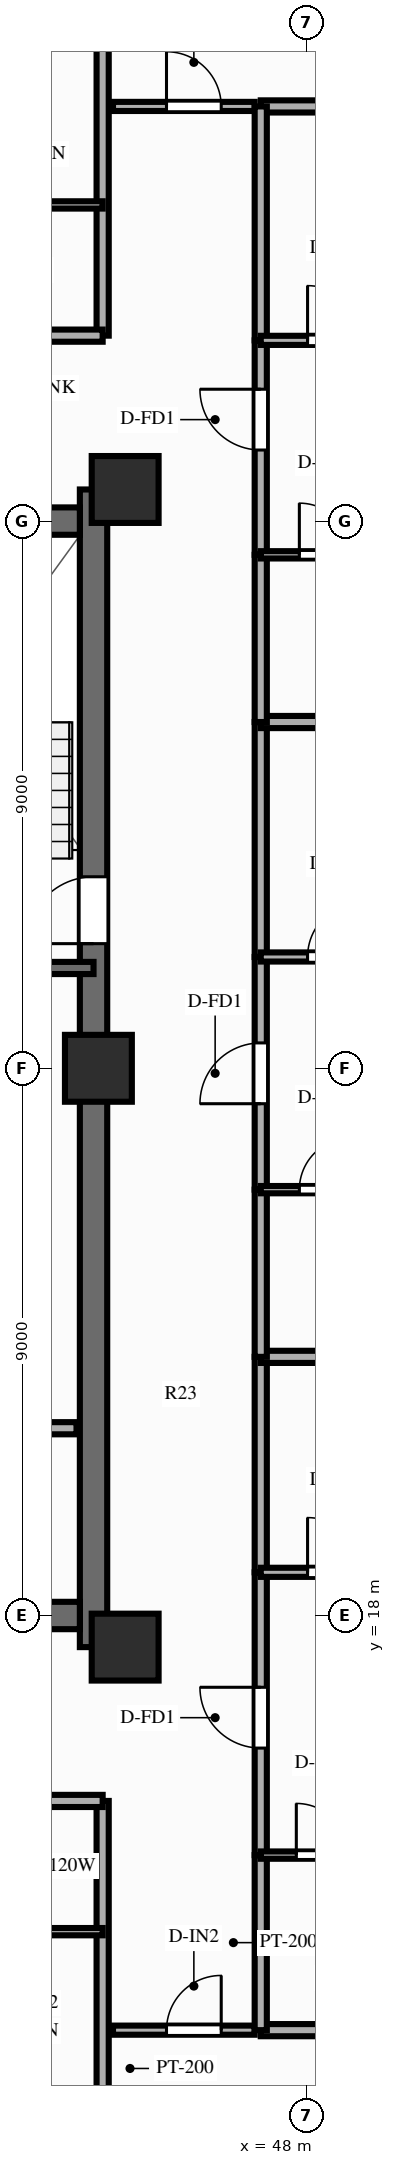
"""IFC4 building model, lengths in metres.
Left out: names, types, materials, properties, quantities, classifications, styles, units other than length and angle.
Written with IfcOpenShell. Run it as: python <this file> out.ifc"""

import sys

from ifc_helpers import new_model, si_unit, direction, frame, frame_2d, origin, origin_2d, place, context, subcontext, project, spatial, rectangle, extrude, source, transform, mapped, element, fill, save


model = new_model("IFC4")
c1 = context("Model", 3, precision=1e-05, world=origin(), true_north=direction((0.0, 1.0)))
c2 = subcontext(c1, "Body", "Model", "MODEL_VIEW")
j1 = project(units=[si_unit("LENGTHUNIT", "METRE"), si_unit("PLANEANGLEUNIT", "RADIAN")], contexts=[c1])
p1 = place(None, origin())
s1 = spatial("IfcSite", under=j1, at=p1, CompositionType="ELEMENT")
p2 = place(p1, origin())
s2 = spatial("IfcBuilding", under=s1, at=p2, CompositionType="ELEMENT")
p3 = place(p2, frame((0.0, 0.0, 179.8)))
s3 = spatial("IfcBuildingStorey", under=s2, at=p3, CompositionType="ELEMENT", Elevation=179.8)
p4 = place(p3, frame((44.5, 17.48, 0.0), z_axis=(0.0, 0.0, 1.0), x_axis=(0.0, 1.0, 0.0)))
e1 = element("IfcWall", 1, at=p4, inside=s3, PredefinedType="SHEAR", context=c2, shape_type="SweptSolid", body=[
    extrude(rectangle(XDim=19.04, YDim=0.45, at=frame_2d((9.52, 0.0))), origin(), (0.0, 0.0, 1.0), 3.0),
])
p5 = place(p4, frame((12.67, 0.0, 0.0), z_axis=(0.0, 0.0, 1.0), x_axis=(-1.0, 0.0, 0.0)))
e2 = element("IfcOpeningElement", 2, at=p5, cuts=e1, PredefinedType="OPENING", context=c2, shape_type="SweptSolid", body=[
    extrude(rectangle(XDim=1.1, YDim=2.15, at=frame_2d((0.55, 1.075))), frame((0.0, 0.237, 0.0), z_axis=(0.0, -1.0, 0.0), x_axis=(1.0, 0.0, 0.0)), (0.0, 0.0, 1.0), 0.474),
])
p6 = place(p3, frame((31.725, 18.0, 0.0), z_axis=(0.0, 0.0, 1.0), x_axis=(1.0, 0.0, 0.0)))
e3 = element("IfcWall", 3, at=p6, inside=s3, PredefinedType="SHEAR", context=c2, shape_type="SweptSolid", body=[
    extrude(rectangle(XDim=12.55, YDim=0.45, at=frame_2d((6.275, 0.0))), origin(), (0.0, 0.0, 1.0), 3.0),
])
p7 = place(p3, frame((31.725, 36.0, 0.0), z_axis=(0.0, 0.0, 1.0), x_axis=(1.0, 0.0, 0.0)))
e4 = element("IfcWall", 4, at=p7, inside=s3, PredefinedType="SHEAR", context=c2, shape_type="SweptSolid", body=[
    extrude(rectangle(XDim=12.55, YDim=0.45, at=frame_2d((6.275, 0.0))), origin(), (0.0, 0.0, 1.0), 3.0),
])
p8 = place(p7, frame((5.225, 0.0, 0.0), z_axis=(0.0, 0.0, 1.0), x_axis=(-1.0, 0.0, 0.0)))
e5 = element("IfcOpeningElement", 5, at=p8, cuts=e4, PredefinedType="OPENING", context=c2, shape_type="SweptSolid", body=[
    extrude(rectangle(XDim=1.4, YDim=2.15, at=frame_2d((0.7, 1.075))), frame((0.0, 0.237, 0.0), z_axis=(0.0, -1.0, 0.0), x_axis=(1.0, 0.0, 0.0)), (0.0, 0.0, 1.0), 0.474),
])
m1 = source(origin(), c2, "Body", "SweptSolid", [
    extrude(rectangle(XDim=1.1, YDim=1.1, at=origin_2d()), origin(), (0.0, 0.0, 1.0), 3.0),
])
for number, where, z_axis, x_axis in (
    (6, (45.02, 17.48, 0.0), (0.0, 0.0, 1.0), (1.0, 0.0, 0.0)),
    (7, (45.02, 36.52, 0.0), (0.0, 0.0, 1.0), (1.0, 0.0, 0.0)),
    (8, (44.58, 27.0, 0.0), (0.0, 0.0, 1.0), (1.0, 0.0, 0.0)),
):
    element("IfcColumn", number, at=place(p3, frame(where, z_axis=z_axis, x_axis=x_axis)), inside=s3, PredefinedType="COLUMN", context=c2, shape_type="MappedRepresentation", body=[
        mapped(m1, transform((0.0, 0.0, 0.0), scale=1.0)),
    ])
p9 = place(p3, frame((42.88, 21.08, 0.0), z_axis=(0.0, 0.0, 1.0), x_axis=(1.0, 0.0, 0.0)))
e9 = element("IfcWall", 9, at=p9, inside=s3, PredefinedType="PARTITIONING", context=c2, shape_type="SweptSolid", body=[
    extrude(rectangle(XDim=1.34, YDim=0.2, at=frame_2d((0.67, 0.0))), origin(), (0.0, 0.0, 1.0), 2.79),
])
p10 = place(p3, frame((40.57, 28.65, 0.0), z_axis=(0.0, 0.0, 1.0), x_axis=(1.0, 0.0, 0.0)))
e10 = element("IfcWall", 10, at=p10, inside=s3, PredefinedType="SOLIDWALL", context=c2, shape_type="SweptSolid", body=[
    extrude(rectangle(XDim=3.93, YDim=0.2, at=frame_2d((1.965, 0.0))), origin(), (0.0, 0.0, 1.0), 2.79),
])
p11 = place(p3, frame((44.82, 11.18, 0.0), z_axis=(0.0, 0.0, 1.0), x_axis=(1.0, 0.0, 0.0)))
e11 = element("IfcWall", 11, at=p11, inside=s3, PredefinedType="PARTITIONING", context=c2, shape_type="SweptSolid", body=[
    extrude(rectangle(XDim=2.33, YDim=0.15, at=frame_2d((1.165, 0.0))), origin(), (0.0, 0.0, 1.0), 2.79),
])
p12 = place(p11, frame((0.88, 0.0, 0.0)))
e12 = element("IfcOpeningElement", 12, at=p12, cuts=e11, PredefinedType="OPENING", context=c2, shape_type="SweptSolid", body=[
    extrude(rectangle(XDim=0.9, YDim=2.1, at=frame_2d((0.45, 1.05))), frame((0.0, 0.087, 0.0), z_axis=(0.0, -1.0, 0.0), x_axis=(1.0, 0.0, 0.0)), (0.0, 0.0, 1.0), 0.174),
])
p13 = place(p3, frame((44.82, 42.82, 0.0), z_axis=(0.0, 0.0, 1.0), x_axis=(1.0, 0.0, 0.0)))
e13 = element("IfcWall", 13, at=p13, inside=s3, PredefinedType="PARTITIONING", context=c2, shape_type="SweptSolid", body=[
    extrude(rectangle(XDim=2.33, YDim=0.15, at=frame_2d((1.165, 0.0))), origin(), (0.0, 0.0, 1.0), 2.79),
])
p14 = place(p13, frame((0.88, 0.0, 0.0)))
e14 = element("IfcOpeningElement", 14, at=p14, cuts=e13, PredefinedType="OPENING", context=c2, shape_type="SweptSolid", body=[
    extrude(rectangle(XDim=0.9, YDim=2.1, at=frame_2d((0.45, 1.05))), frame((0.0, 0.087, 0.0), z_axis=(0.0, -1.0, 0.0), x_axis=(1.0, 0.0, 0.0)), (0.0, 0.0, 1.0), 0.174),
])
p15 = place(p3, frame((44.65, 14.95, 0.0), z_axis=(0.0, 0.0, 1.0), x_axis=(0.0, -1.0, 0.0)))
e15 = element("IfcWall", 15, at=p15, inside=s3, PredefinedType="PARTITIONING", context=c2, shape_type="SweptSolid", body=[
    extrude(rectangle(XDim=8.8, YDim=0.2, at=frame_2d((4.4, 0.0))), origin(), (0.0, 0.0, 1.0), 2.39),
])
p16 = place(p3, frame((41.8, 14.95, 0.0), z_axis=(0.0, 0.0, 1.0), x_axis=(1.0, 0.0, 0.0)))
e16 = element("IfcWall", 16, at=p16, inside=s3, PredefinedType="PARTITIONING", context=c2, shape_type="SweptSolid", body=[
    extrude(rectangle(XDim=2.85, YDim=0.2, at=frame_2d((1.425, 0.0))), origin(), (0.0, 0.0, 1.0), 2.79),
])
p17 = place(p3, frame((41.8, 12.8, 0.0), z_axis=(0.0, 0.0, 1.0), x_axis=(1.0, 0.0, 0.0)))
e17 = element("IfcWall", 17, at=p17, inside=s3, PredefinedType="PARTITIONING", context=c2, shape_type="SweptSolid", body=[
    extrude(rectangle(XDim=2.85, YDim=0.12, at=frame_2d((1.425, 0.0))), origin(), (0.0, 0.0, 1.0), 2.79),
])
p18 = place(p3, frame((44.65, 39.05, 0.0), z_axis=(0.0, 0.0, 1.0), x_axis=(0.0, 1.0, 0.0)))
e18 = element("IfcWall", 18, at=p18, inside=s3, PredefinedType="PARTITIONING", context=c2, shape_type="SweptSolid", body=[
    extrude(rectangle(XDim=8.8, YDim=0.2, at=frame_2d((4.4, 0.0))), origin(), (0.0, 0.0, 1.0), 2.39),
])
p19 = place(p3, frame((41.88, 39.05, 0.0), z_axis=(0.0, 0.0, 1.0), x_axis=(1.0, 0.0, 0.0)))
e19 = element("IfcWall", 19, at=p19, inside=s3, PredefinedType="PARTITIONING", context=c2, shape_type="SweptSolid", body=[
    extrude(rectangle(XDim=2.77, YDim=0.2, at=frame_2d((1.385, 0.0))), origin(), (0.0, 0.0, 1.0), 2.79),
])
p20 = place(p3, frame((41.88, 41.2, 0.0), z_axis=(0.0, 0.0, 1.0), x_axis=(1.0, 0.0, 0.0)))
e20 = element("IfcWall", 20, at=p20, inside=s3, PredefinedType="PARTITIONING", context=c2, shape_type="SweptSolid", body=[
    extrude(rectangle(XDim=2.77, YDim=0.12, at=frame_2d((1.385, 0.0))), origin(), (0.0, 0.0, 1.0), 2.79),
])
for number, where, z_axis, x_axis in (
    (21, (47.25, 11.18, 0.0), (0.0, 0.0, 1.0), (1.0, 0.0, 0.0)),
    (22, (47.25, 42.82, 0.0), (0.0, 0.0, 1.0), (1.0, 0.0, 0.0)),
):
    element("IfcWall", number, at=place(p3, frame(where, z_axis=z_axis, x_axis=x_axis)), inside=s3, PredefinedType="PARTITIONING", context=c2, shape_type="SweptSolid", body=[
        extrude(rectangle(XDim=10.85, YDim=0.2, at=frame_2d((5.425, 0.0))), origin(), (0.0, 0.0, 1.0), 2.79),
    ])
p21 = place(p3, frame((47.25, 11.18, 0.0), z_axis=(0.0, 0.0, 1.0), x_axis=(0.0, 1.0, 0.0)))
e23 = element("IfcWall", 23, at=p21, inside=s3, PredefinedType="PARTITIONING", context=c2, shape_type="SweptSolid", body=[
    extrude(rectangle(XDim=2.879, YDim=0.2, at=frame_2d((1.439, 0.0))), origin(), (0.0, 0.0, 1.0), 2.79),
])
p22 = place(p3, frame((47.25, 14.059, 0.0), z_axis=(0.0, 0.0, 1.0), x_axis=(0.0, 1.0, 0.0)))
e24 = element("IfcWall", 24, at=p22, inside=s3, PredefinedType="PARTITIONING", context=c2, shape_type="SweptSolid", body=[
    extrude(rectangle(XDim=4.651, YDim=0.2, at=frame_2d((2.326, 0.0))), origin(), (0.0, 0.0, 1.0), 2.79),
])
p23 = place(p22, frame((1.76, 0.0, 0.0)))
e25 = element("IfcOpeningElement", 25, at=p23, cuts=e24, PredefinedType="OPENING", context=c2, shape_type="SweptSolid", body=[
    extrude(rectangle(XDim=1.0, YDim=2.15, at=frame_2d((0.5, 1.075))), frame((0.0, 0.112, 0.0), z_axis=(0.0, -1.0, 0.0), x_axis=(1.0, 0.0, 0.0)), (0.0, 0.0, 1.0), 0.224),
])
p24 = place(p3, frame((47.25, 18.71, 0.0), z_axis=(0.0, 0.0, 1.0), x_axis=(0.0, 1.0, 0.0)))
e26 = element("IfcWall", 26, at=p24, inside=s3, PredefinedType="PARTITIONING", context=c2, shape_type="SweptSolid", body=[
    extrude(rectangle(XDim=3.544, YDim=0.2, at=frame_2d((1.772, 0.0))), origin(), (0.0, 0.0, 1.0), 2.79),
])
p25 = place(p3, frame((47.25, 14.059, 0.0), z_axis=(0.0, 0.0, 1.0), x_axis=(1.0, 0.0, 0.0)))
e27 = element("IfcWall", 27, at=p25, inside=s3, PredefinedType="PARTITIONING", context=c2, shape_type="SweptSolid", body=[
    extrude(rectangle(XDim=2.02, YDim=0.12, at=frame_2d((1.01, 0.0))), origin(), (0.0, 0.0, 1.0), 2.79),
])
p26 = place(p25, frame((0.585, 0.0, 0.0)))
e28 = element("IfcOpeningElement", 28, at=p26, cuts=e27, PredefinedType="OPENING", context=c2, shape_type="SweptSolid", body=[
    extrude(rectangle(XDim=0.85, YDim=2.05, at=frame_2d((0.425, 1.025))), frame((0.0, 0.072, 0.0), z_axis=(0.0, -1.0, 0.0), x_axis=(1.0, 0.0, 0.0)), (0.0, 0.0, 1.0), 0.144),
])
p27 = place(p3, frame((47.25, 18.71, 0.0), z_axis=(0.0, 0.0, 1.0), x_axis=(1.0, 0.0, 0.0)))
e29 = element("IfcWall", 29, at=p27, inside=s3, PredefinedType="PARTITIONING", context=c2, shape_type="SweptSolid", body=[
    extrude(rectangle(XDim=2.44, YDim=0.15, at=frame_2d((1.22, 0.0))), origin(), (0.0, 0.0, 1.0), 2.79),
])
p28 = place(p27, frame((0.77, 0.0, 0.0)))
e30 = element("IfcOpeningElement", 30, at=p28, cuts=e29, PredefinedType="OPENING", context=c2, shape_type="SweptSolid", body=[
    extrude(rectangle(XDim=0.9, YDim=2.1, at=frame_2d((0.45, 1.05))), frame((0.0, 0.087, 0.0), z_axis=(0.0, -1.0, 0.0), x_axis=(1.0, 0.0, 0.0)), (0.0, 0.0, 1.0), 0.174),
])
p29 = place(p3, frame((47.25, 22.254, 0.0), z_axis=(0.0, 0.0, 1.0), x_axis=(1.0, 0.0, 0.0)))
e31 = element("IfcWall", 31, at=p29, inside=s3, PredefinedType="PARTITIONING", context=c2, shape_type="SweptSolid", body=[
    extrude(rectangle(XDim=10.85, YDim=0.2, at=frame_2d((5.425, 0.0))), origin(), (0.0, 0.0, 1.0), 2.39),
])
p30 = place(p3, frame((47.25, 22.254, 0.0), z_axis=(0.0, 0.0, 1.0), x_axis=(0.0, 1.0, 0.0)))
e32 = element("IfcWall", 32, at=p30, inside=s3, PredefinedType="PARTITIONING", context=c2, shape_type="SweptSolid", body=[
    extrude(rectangle(XDim=2.75, YDim=0.2, at=frame_2d((1.375, 0.0))), origin(), (0.0, 0.0, 1.0), 2.79),
])
p31 = place(p3, frame((47.25, 25.004, 0.0), z_axis=(0.0, 0.0, 1.0), x_axis=(0.0, 1.0, 0.0)))
e33 = element("IfcWall", 33, at=p31, inside=s3, PredefinedType="PARTITIONING", context=c2, shape_type="SweptSolid", body=[
    extrude(rectangle(XDim=3.827, YDim=0.2, at=frame_2d((1.914, 0.0))), origin(), (0.0, 0.0, 1.0), 2.79),
])
p32 = place(p31, frame((1.413, 0.0, 0.0)))
e34 = element("IfcOpeningElement", 34, at=p32, cuts=e33, PredefinedType="OPENING", context=c2, shape_type="SweptSolid", body=[
    extrude(rectangle(XDim=1.0, YDim=2.15, at=frame_2d((0.5, 1.075))), frame((0.0, 0.112, 0.0), z_axis=(0.0, -1.0, 0.0), x_axis=(1.0, 0.0, 0.0)), (0.0, 0.0, 1.0), 0.224),
])
p33 = place(p3, frame((47.25, 28.831, 0.0), z_axis=(0.0, 0.0, 1.0), x_axis=(0.0, 1.0, 0.0)))
e35 = element("IfcWall", 35, at=p33, inside=s3, PredefinedType="PARTITIONING", context=c2, shape_type="SweptSolid", body=[
    extrude(rectangle(XDim=3.865, YDim=0.2, at=frame_2d((1.932, 0.0))), origin(), (0.0, 0.0, 1.0), 2.79),
])
p34 = place(p3, frame((47.25, 25.004, 0.0), z_axis=(0.0, 0.0, 1.0), x_axis=(1.0, 0.0, 0.0)))
e36 = element("IfcWall", 36, at=p34, inside=s3, PredefinedType="PARTITIONING", context=c2, shape_type="SweptSolid", body=[
    extrude(rectangle(XDim=2.12, YDim=0.12, at=frame_2d((1.06, 0.0))), origin(), (0.0, 0.0, 1.0), 2.79),
])
p35 = place(p34, frame((0.635, 0.0, 0.0)))
e37 = element("IfcOpeningElement", 37, at=p35, cuts=e36, PredefinedType="OPENING", context=c2, shape_type="SweptSolid", body=[
    extrude(rectangle(XDim=0.85, YDim=2.05, at=frame_2d((0.425, 1.025))), frame((0.0, 0.072, 0.0), z_axis=(0.0, -1.0, 0.0), x_axis=(1.0, 0.0, 0.0)), (0.0, 0.0, 1.0), 0.144),
])
p36 = place(p3, frame((47.25, 28.831, 0.0), z_axis=(0.0, 0.0, 1.0), x_axis=(1.0, 0.0, 0.0)))
e38 = element("IfcWall", 38, at=p36, inside=s3, PredefinedType="PARTITIONING", context=c2, shape_type="SweptSolid", body=[
    extrude(rectangle(XDim=2.44, YDim=0.15, at=frame_2d((1.22, 0.0))), origin(), (0.0, 0.0, 1.0), 2.79),
])
p37 = place(p36, frame((0.77, 0.0, 0.0)))
e39 = element("IfcOpeningElement", 39, at=p37, cuts=e38, PredefinedType="OPENING", context=c2, shape_type="SweptSolid", body=[
    extrude(rectangle(XDim=0.9, YDim=2.1, at=frame_2d((0.45, 1.05))), frame((0.0, 0.087, 0.0), z_axis=(0.0, -1.0, 0.0), x_axis=(1.0, 0.0, 0.0)), (0.0, 0.0, 1.0), 0.174),
])
p38 = place(p3, frame((47.25, 32.695, 0.0), z_axis=(0.0, 0.0, 1.0), x_axis=(1.0, 0.0, 0.0)))
e40 = element("IfcWall", 40, at=p38, inside=s3, PredefinedType="PARTITIONING", context=c2, shape_type="SweptSolid", body=[
    extrude(rectangle(XDim=10.85, YDim=0.2, at=frame_2d((5.425, 0.0))), origin(), (0.0, 0.0, 1.0), 2.79),
])
p39 = place(p3, frame((47.25, 32.695, 0.0), z_axis=(0.0, 0.0, 1.0), x_axis=(0.0, 1.0, 0.0)))
e41 = element("IfcWall", 41, at=p39, inside=s3, PredefinedType="PARTITIONING", context=c2, shape_type="SweptSolid", body=[
    extrude(rectangle(XDim=2.75, YDim=0.2, at=frame_2d((1.375, 0.0))), origin(), (0.0, 0.0, 1.0), 2.79),
])
p40 = place(p3, frame((47.25, 35.445, 0.0), z_axis=(0.0, 0.0, 1.0), x_axis=(0.0, 1.0, 0.0)))
e42 = element("IfcWall", 42, at=p40, inside=s3, PredefinedType="PARTITIONING", context=c2, shape_type="SweptSolid", body=[
    extrude(rectangle(XDim=3.527, YDim=0.2, at=frame_2d((1.764, 0.0))), origin(), (0.0, 0.0, 1.0), 2.79),
])
p41 = place(p40, frame((1.724, 0.0, 0.0)))
e43 = element("IfcOpeningElement", 43, at=p41, cuts=e42, PredefinedType="OPENING", context=c2, shape_type="SweptSolid", body=[
    extrude(rectangle(XDim=1.0, YDim=2.15, at=frame_2d((0.5, 1.075))), frame((0.0, 0.112, 0.0), z_axis=(0.0, -1.0, 0.0), x_axis=(1.0, 0.0, 0.0)), (0.0, 0.0, 1.0), 0.224),
])
p42 = place(p3, frame((47.25, 38.973, 0.0), z_axis=(0.0, 0.0, 1.0), x_axis=(0.0, 1.0, 0.0)))
e44 = element("IfcWall", 44, at=p42, inside=s3, PredefinedType="PARTITIONING", context=c2, shape_type="SweptSolid", body=[
    extrude(rectangle(XDim=3.847, YDim=0.2, at=frame_2d((1.924, 0.0))), origin(), (0.0, 0.0, 1.0), 2.79),
])
p43 = place(p3, frame((47.25, 35.445, 0.0), z_axis=(0.0, 0.0, 1.0), x_axis=(1.0, 0.0, 0.0)))
e45 = element("IfcWall", 45, at=p43, inside=s3, PredefinedType="PARTITIONING", context=c2, shape_type="SweptSolid", body=[
    extrude(rectangle(XDim=2.12, YDim=0.12, at=frame_2d((1.06, 0.0))), origin(), (0.0, 0.0, 1.0), 2.79),
])
p44 = place(p43, frame((0.635, 0.0, 0.0)))
e46 = element("IfcOpeningElement", 46, at=p44, cuts=e45, PredefinedType="OPENING", context=c2, shape_type="SweptSolid", body=[
    extrude(rectangle(XDim=0.85, YDim=2.05, at=frame_2d((0.425, 1.025))), frame((0.0, 0.072, 0.0), z_axis=(0.0, -1.0, 0.0), x_axis=(1.0, 0.0, 0.0)), (0.0, 0.0, 1.0), 0.144),
])
p45 = place(p3, frame((47.25, 38.973, 0.0), z_axis=(0.0, 0.0, 1.0), x_axis=(1.0, 0.0, 0.0)))
e47 = element("IfcWall", 47, at=p45, inside=s3, PredefinedType="PARTITIONING", context=c2, shape_type="SweptSolid", body=[
    extrude(rectangle(XDim=2.44, YDim=0.15, at=frame_2d((1.22, 0.0))), origin(), (0.0, 0.0, 1.0), 2.79),
])
p46 = place(p45, frame((0.77, 0.0, 0.0)))
e48 = element("IfcOpeningElement", 48, at=p46, cuts=e47, PredefinedType="OPENING", context=c2, shape_type="SweptSolid", body=[
    extrude(rectangle(XDim=0.9, YDim=2.1, at=frame_2d((0.45, 1.05))), frame((0.0, 0.087, 0.0), z_axis=(0.0, -1.0, 0.0), x_axis=(1.0, 0.0, 0.0)), (0.0, 0.0, 1.0), 0.174),
])
m2 = source(origin(), c2, "Body", "SweptSolid", [
    extrude(rectangle(XDim=1.1, YDim=2.15, at=frame_2d((0.55, 1.075))), frame((0.0, 0.025, 0.0), z_axis=(0.0, -1.0, 0.0), x_axis=(1.0, 0.0, 0.0)), (0.0, 0.0, 1.0), 0.05),
])
p47 = place(p5, origin())
e49 = element("IfcDoor", 49, at=p47, inside=s3, OperationType="SINGLE_SWING_RIGHT", PredefinedType="DOOR", context=c2, shape_type="MappedRepresentation", body=[
    mapped(m2, transform((0.0, 0.0, 0.0), scale=1.0)),
])
fill(e2, e49)
m3 = source(origin(), c2, "Body", "SweptSolid", [
    extrude(rectangle(XDim=0.9, YDim=2.1, at=frame_2d((0.45, 1.05))), frame((0.0, 0.025, 0.0), z_axis=(0.0, -1.0, 0.0), x_axis=(1.0, 0.0, 0.0)), (0.0, 0.0, 1.0), 0.05),
])
p48 = place(p12, origin())
e50 = element("IfcDoor", 50, at=p48, inside=s3, OperationType="SINGLE_SWING_RIGHT", PredefinedType="DOOR", context=c2, shape_type="MappedRepresentation", body=[
    mapped(m3, transform((0.0, 0.0, 0.0), scale=1.0)),
])
fill(e12, e50)
p49 = place(p14, origin())
e51 = element("IfcDoor", 51, at=p49, inside=s3, OperationType="SINGLE_SWING_LEFT", PredefinedType="DOOR", context=c2, shape_type="MappedRepresentation", body=[
    mapped(m3, transform((0.0, 0.0, 0.0), scale=1.0)),
])
fill(e14, e51)
m4 = source(origin(), c2, "Body", "SweptSolid", [
    extrude(rectangle(XDim=1.0, YDim=2.15, at=frame_2d((0.5, 1.075))), frame((0.0, 0.025, 0.0), z_axis=(0.0, -1.0, 0.0), x_axis=(1.0, 0.0, 0.0)), (0.0, 0.0, 1.0), 0.05),
])
p50 = place(p23, origin())
e52 = element("IfcDoor", 52, at=p50, inside=s3, OperationType="SINGLE_SWING_RIGHT", PredefinedType="DOOR", context=c2, shape_type="MappedRepresentation", body=[
    mapped(m4, transform((0.0, 0.0, 0.0), scale=1.0)),
])
fill(e25, e52)
m5 = source(origin(), c2, "Body", "SweptSolid", [
    extrude(rectangle(XDim=0.85, YDim=2.05, at=frame_2d((0.425, 1.025))), frame((0.0, 0.025, 0.0), z_axis=(0.0, -1.0, 0.0), x_axis=(1.0, 0.0, 0.0)), (0.0, 0.0, 1.0), 0.05),
])
p51 = place(p26, origin())
e53 = element("IfcDoor", 53, at=p51, inside=s3, OperationType="SINGLE_SWING_LEFT", PredefinedType="DOOR", context=c2, shape_type="MappedRepresentation", body=[
    mapped(m5, transform((0.0, 0.0, 0.0), scale=1.0)),
])
fill(e28, e53)
p52 = place(p28, origin())
e54 = element("IfcDoor", 54, at=p52, inside=s3, OperationType="SINGLE_SWING_LEFT", PredefinedType="DOOR", context=c2, shape_type="MappedRepresentation", body=[
    mapped(m3, transform((0.0, 0.0, 0.0), scale=1.0)),
])
fill(e30, e54)
p53 = place(p32, origin())
e55 = element("IfcDoor", 55, at=p53, inside=s3, OperationType="SINGLE_SWING_LEFT", PredefinedType="DOOR", context=c2, shape_type="MappedRepresentation", body=[
    mapped(m4, transform((0.0, 0.0, 0.0), scale=1.0)),
])
fill(e34, e55)
p54 = place(p35, origin())
e56 = element("IfcDoor", 56, at=p54, inside=s3, OperationType="SINGLE_SWING_RIGHT", PredefinedType="DOOR", context=c2, shape_type="MappedRepresentation", body=[
    mapped(m5, transform((0.0, 0.0, 0.0), scale=1.0)),
])
fill(e37, e56)
p55 = place(p37, origin())
e57 = element("IfcDoor", 57, at=p55, inside=s3, OperationType="SINGLE_SWING_RIGHT", PredefinedType="DOOR", context=c2, shape_type="MappedRepresentation", body=[
    mapped(m3, transform((0.0, 0.0, 0.0), scale=1.0)),
])
fill(e39, e57)
p56 = place(p41, origin())
e58 = element("IfcDoor", 58, at=p56, inside=s3, OperationType="SINGLE_SWING_RIGHT", PredefinedType="DOOR", context=c2, shape_type="MappedRepresentation", body=[
    mapped(m4, transform((0.0, 0.0, 0.0), scale=1.0)),
])
fill(e43, e58)
p57 = place(p44, origin())
e59 = element("IfcDoor", 59, at=p57, inside=s3, OperationType="SINGLE_SWING_LEFT", PredefinedType="DOOR", context=c2, shape_type="MappedRepresentation", body=[
    mapped(m5, transform((0.0, 0.0, 0.0), scale=1.0)),
])
fill(e46, e59)
p58 = place(p46, origin())
e60 = element("IfcDoor", 60, at=p58, inside=s3, OperationType="SINGLE_SWING_LEFT", PredefinedType="DOOR", context=c2, shape_type="MappedRepresentation", body=[
    mapped(m3, transform((0.0, 0.0, 0.0), scale=1.0)),
])
fill(e48, e60)
save(model, sys.argv[1])
